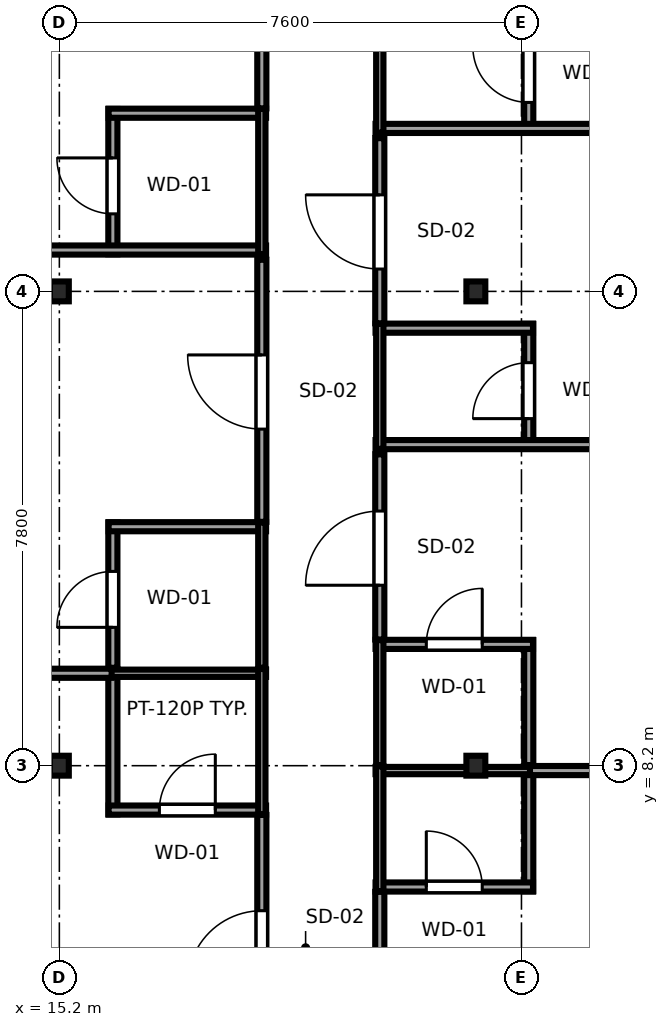
"""IFC4 building model, lengths in metres.
Left out: names, types, materials, properties, quantities, classifications, styles, units other than length and angle.
Written with IfcOpenShell. Run it as: python <this file> out.ifc"""

import sys

from ifc_helpers import new_model, si_unit, direction, frame, frame_2d, origin, origin_2d, place, context, subcontext, project, spatial, rectangle, i_section, extrude, source, transform, mapped, element, fill, save


model = new_model("IFC4")
c1 = context("Model", 3, precision=1e-05, world=origin(), true_north=direction((0.0, 1.0)))
c2 = subcontext(c1, "Body", "Model", "MODEL_VIEW")
j1 = project(units=[si_unit("LENGTHUNIT", "METRE"), si_unit("PLANEANGLEUNIT", "RADIAN")], contexts=[c1])
p1 = place(None, origin())
s1 = spatial("IfcSite", under=j1, at=p1, CompositionType="ELEMENT")
p2 = place(p1, origin())
s2 = spatial("IfcBuilding", under=s1, at=p2, CompositionType="ELEMENT")
p3 = place(p2, frame((0.0, 0.0, 238.1)))
s3 = spatial("IfcBuildingStorey", under=s2, at=p3, CompositionType="ELEMENT", Elevation=238.1)
m1 = source(origin(), c2, "Body", "SweptSolid", [
    extrude(i_section(OverallWidth=0.311, OverallDepth=0.327, WebThickness=0.016, FlangeThickness=0.025, FilletRadius=0.017, at=origin_2d()), origin(), (0.0, 0.0, 1.0), 3.55),
])
for number, where, z_axis, x_axis in (
    (1, (15.2, 8.2, 0.0), (0.0, 0.0, 1.0), (1.0, 0.0, 0.0)),
    (2, (15.2, 16.0, 0.0), (0.0, 0.0, 1.0), (1.0, 0.0, 0.0)),
    (3, (22.05, 8.2, 0.0), (0.0, 0.0, 1.0), (1.0, 0.0, 0.0)),
    (4, (22.05, 16.0, 0.0), (0.0, 0.0, 1.0), (1.0, 0.0, 0.0)),
):
    element("IfcColumn", number, at=place(p3, frame(where, z_axis=z_axis, x_axis=x_axis)), inside=s3, PredefinedType="COLUMN", context=c2, shape_type="MappedRepresentation", body=[
        mapped(m1, transform((0.0, 0.0, 0.0), x_axis=(1.0, 0.0, 0.0), y_axis=(0.0, 1.0, 0.0), z_axis=(0.0, 0.0, 1.0), scale=1.0)),
    ])
p4 = place(p3, frame((16.08, 7.4, 0.0), z_axis=(0.0, 0.0, 1.0), x_axis=(0.0, 1.0, 0.0)))
e5 = element("IfcWall", 5, at=p4, inside=s3, PredefinedType="PARTITIONING", context=c2, shape_type="SweptSolid", body=[
    extrude(rectangle(XDim=2.39, YDim=0.15, at=frame_2d((1.195, 0.0))), origin(), (0.0, 0.0, 1.0), 3.29),
])
p5 = place(p3, frame((16.01, 7.47, 0.0), z_axis=(0.0, 0.0, 1.0), x_axis=(1.0, 0.0, 0.0)))
e6 = element("IfcWall", 6, at=p5, inside=s3, PredefinedType="PARTITIONING", context=c2, shape_type="SweptSolid", body=[
    extrude(rectangle(XDim=2.59, YDim=0.15, at=frame_2d((1.295, 0.0))), origin(), (0.0, 0.0, 1.0), 3.29),
])
p6 = place(p5, frame((0.835, 0.0, 0.0)))
e7 = element("IfcOpeningElement", 7, at=p6, cuts=e6, PredefinedType="OPENING", context=c2, shape_type="SweptSolid", body=[
    extrude(rectangle(XDim=0.92, YDim=2.01, at=frame_2d((0.46, 1.005))), frame((0.0, 0.085, 0.0), z_axis=(0.0, -1.0, 0.0), x_axis=(1.0, 0.0, 0.0)), (0.0, 0.0, 1.0), 0.17),
])
p7 = place(p3, frame((16.01, 9.72, 0.0), z_axis=(0.0, 0.0, 1.0), x_axis=(1.0, 0.0, 0.0)))
e8 = element("IfcWall", 8, at=p7, inside=s3, PredefinedType="PLUMBINGWALL", context=c2, shape_type="SweptSolid", body=[
    extrude(rectangle(XDim=2.59, YDim=0.12, at=frame_2d((1.295, 0.0))), origin(), (0.0, 0.0, 1.0), 3.29),
])
p8 = place(p3, frame((18.53, 7.4, 0.0), z_axis=(0.0, 0.0, 1.0), x_axis=(0.0, 1.0, 0.0)))
e9 = element("IfcWall", 9, at=p8, inside=s3, PredefinedType="PLUMBINGWALL", context=c2, shape_type="SweptSolid", body=[
    extrude(rectangle(XDim=2.39, YDim=0.12, at=frame_2d((1.195, 0.0))), origin(), (0.0, 0.0, 1.0), 3.29),
])
p9 = place(p3, frame((16.08, 9.81, 0.0), z_axis=(0.0, 0.0, 1.0), x_axis=(0.0, 1.0, 0.0)))
e10 = element("IfcWall", 10, at=p9, inside=s3, PredefinedType="PARTITIONING", context=c2, shape_type="SweptSolid", body=[
    extrude(rectangle(XDim=2.39, YDim=0.15, at=frame_2d((1.195, 0.0))), origin(), (0.0, 0.0, 1.0), 3.29),
])
p10 = place(p9, frame((0.665, 0.0, 0.0)))
e11 = element("IfcOpeningElement", 11, at=p10, cuts=e10, PredefinedType="OPENING", context=c2, shape_type="SweptSolid", body=[
    extrude(rectangle(XDim=0.92, YDim=2.01, at=frame_2d((0.46, 1.005))), frame((0.0, 0.085, 0.0), z_axis=(0.0, -1.0, 0.0), x_axis=(1.0, 0.0, 0.0)), (0.0, 0.0, 1.0), 0.17),
])
p11 = place(p3, frame((16.01, 12.13, 0.0), z_axis=(0.0, 0.0, 1.0), x_axis=(1.0, 0.0, 0.0)))
e12 = element("IfcWall", 12, at=p11, inside=s3, PredefinedType="PARTITIONING", context=c2, shape_type="SweptSolid", body=[
    extrude(rectangle(XDim=2.59, YDim=0.15, at=frame_2d((1.295, 0.0))), origin(), (0.0, 0.0, 1.0), 3.29),
])
p12 = place(p3, frame((18.53, 9.81, 0.0), z_axis=(0.0, 0.0, 1.0), x_axis=(0.0, 1.0, 0.0)))
e13 = element("IfcWall", 13, at=p12, inside=s3, PredefinedType="PLUMBINGWALL", context=c2, shape_type="SweptSolid", body=[
    extrude(rectangle(XDim=2.39, YDim=0.12, at=frame_2d((1.195, 0.0))), origin(), (0.0, 0.0, 1.0), 3.29),
])
p13 = place(p3, frame((16.08, 16.61, 0.0), z_axis=(0.0, 0.0, 1.0), x_axis=(0.0, 1.0, 0.0)))
e14 = element("IfcWall", 14, at=p13, inside=s3, PredefinedType="PARTITIONING", context=c2, shape_type="SweptSolid", body=[
    extrude(rectangle(XDim=2.39, YDim=0.15, at=frame_2d((1.195, 0.0))), origin(), (0.0, 0.0, 1.0), 3.29),
])
p14 = place(p13, frame((0.665, 0.0, 0.0)))
e15 = element("IfcOpeningElement", 15, at=p14, cuts=e14, PredefinedType="OPENING", context=c2, shape_type="SweptSolid", body=[
    extrude(rectangle(XDim=0.92, YDim=2.01, at=frame_2d((0.46, 1.005))), frame((0.0, 0.085, 0.0), z_axis=(0.0, -1.0, 0.0), x_axis=(1.0, 0.0, 0.0)), (0.0, 0.0, 1.0), 0.17),
])
p15 = place(p3, frame((3.005, 16.68, 0.0), z_axis=(0.0, 0.0, 1.0), x_axis=(1.0, 0.0, 0.0)))
e16 = element("IfcWall", 16, at=p15, inside=s3, PredefinedType="PARTITIONING", context=c2, shape_type="SweptSolid", body=[
    extrude(rectangle(XDim=15.595, YDim=0.15, at=frame_2d((7.798, 0.0))), origin(), (0.0, 0.0, 1.0), 3.29),
])
p16 = place(p3, frame((16.01, 18.93, 0.0), z_axis=(0.0, 0.0, 1.0), x_axis=(1.0, 0.0, 0.0)))
e17 = element("IfcWall", 17, at=p16, inside=s3, PredefinedType="PARTITIONING", context=c2, shape_type="SweptSolid", body=[
    extrude(rectangle(XDim=2.59, YDim=0.15, at=frame_2d((1.295, 0.0))), origin(), (0.0, 0.0, 1.0), 3.29),
])
p17 = place(p3, frame((18.53, 16.61, 0.0), z_axis=(0.0, 0.0, 1.0), x_axis=(0.0, 1.0, 0.0)))
e18 = element("IfcWall", 18, at=p17, inside=s3, PredefinedType="PLUMBINGWALL", context=c2, shape_type="SweptSolid", body=[
    extrude(rectangle(XDim=2.39, YDim=0.12, at=frame_2d((1.195, 0.0))), origin(), (0.0, 0.0, 1.0), 3.29),
])
p18 = place(p3, frame((22.92, 6.135, 0.0), z_axis=(0.0, 0.0, 1.0), x_axis=(0.0, 1.0, 0.0)))
e19 = element("IfcWall", 19, at=p18, inside=s3, PredefinedType="PARTITIONING", context=c2, shape_type="SweptSolid", body=[
    extrude(rectangle(XDim=2.055, YDim=0.15, at=frame_2d((1.027, 0.0))), origin(), (0.0, 0.0, 1.0), 3.29),
])
p19 = place(p3, frame((20.4, 6.205, 0.0), z_axis=(0.0, 0.0, 1.0), x_axis=(1.0, 0.0, 0.0)))
e20 = element("IfcWall", 20, at=p19, inside=s3, PredefinedType="PARTITIONING", context=c2, shape_type="SweptSolid", body=[
    extrude(rectangle(XDim=2.59, YDim=0.15, at=frame_2d((1.295, 0.0))), origin(), (0.0, 0.0, 1.0), 3.29),
])
p20 = place(p19, frame((0.835, 0.0, 0.0)))
e21 = element("IfcOpeningElement", 21, at=p20, cuts=e20, PredefinedType="OPENING", context=c2, shape_type="SweptSolid", body=[
    extrude(rectangle(XDim=0.92, YDim=2.01, at=frame_2d((0.46, 1.005))), frame((0.0, 0.085, 0.0), z_axis=(0.0, -1.0, 0.0), x_axis=(1.0, 0.0, 0.0)), (0.0, 0.0, 1.0), 0.17),
])
p21 = place(p3, frame((20.4, 8.12, 0.0), z_axis=(0.0, 0.0, 1.0), x_axis=(1.0, 0.0, 0.0)))
e22 = element("IfcWall", 22, at=p21, inside=s3, PredefinedType="PLUMBINGWALL", context=c2, shape_type="SweptSolid", body=[
    extrude(rectangle(XDim=2.59, YDim=0.12, at=frame_2d((1.295, 0.0))), origin(), (0.0, 0.0, 1.0), 3.29),
])
p22 = place(p3, frame((20.47, 6.135, 0.0), z_axis=(0.0, 0.0, 1.0), x_axis=(0.0, 1.0, 0.0)))
e23 = element("IfcWall", 23, at=p22, inside=s3, PredefinedType="PLUMBINGWALL", context=c2, shape_type="SweptSolid", body=[
    extrude(rectangle(XDim=2.055, YDim=0.12, at=frame_2d((1.027, 0.0))), origin(), (0.0, 0.0, 1.0), 3.29),
])
p23 = place(p3, frame((22.92, 8.21, 0.0), z_axis=(0.0, 0.0, 1.0), x_axis=(0.0, 1.0, 0.0)))
e24 = element("IfcWall", 24, at=p23, inside=s3, PredefinedType="PARTITIONING", context=c2, shape_type="SweptSolid", body=[
    extrude(rectangle(XDim=2.055, YDim=0.15, at=frame_2d((1.027, 0.0))), origin(), (0.0, 0.0, 1.0), 3.29),
])
p24 = place(p3, frame((20.4, 10.195, 0.0), z_axis=(0.0, 0.0, 1.0), x_axis=(1.0, 0.0, 0.0)))
e25 = element("IfcWall", 25, at=p24, inside=s3, PredefinedType="PARTITIONING", context=c2, shape_type="SweptSolid", body=[
    extrude(rectangle(XDim=2.59, YDim=0.15, at=frame_2d((1.295, 0.0))), origin(), (0.0, 0.0, 1.0), 3.29),
])
p25 = place(p24, frame((0.835, 0.0, 0.0)))
e26 = element("IfcOpeningElement", 26, at=p25, cuts=e25, PredefinedType="OPENING", context=c2, shape_type="SweptSolid", body=[
    extrude(rectangle(XDim=0.92, YDim=2.01, at=frame_2d((0.46, 1.005))), frame((0.0, 0.085, 0.0), z_axis=(0.0, -1.0, 0.0), x_axis=(1.0, 0.0, 0.0)), (0.0, 0.0, 1.0), 0.17),
])
p26 = place(p3, frame((20.47, 8.21, 0.0), z_axis=(0.0, 0.0, 1.0), x_axis=(0.0, 1.0, 0.0)))
e27 = element("IfcWall", 27, at=p26, inside=s3, PredefinedType="PLUMBINGWALL", context=c2, shape_type="SweptSolid", body=[
    extrude(rectangle(XDim=2.055, YDim=0.12, at=frame_2d((1.027, 0.0))), origin(), (0.0, 0.0, 1.0), 3.29),
])
p27 = place(p3, frame((22.92, 13.41, 0.0), z_axis=(0.0, 0.0, 1.0), x_axis=(0.0, 1.0, 0.0)))
e28 = element("IfcWall", 28, at=p27, inside=s3, PredefinedType="PARTITIONING", context=c2, shape_type="SweptSolid", body=[
    extrude(rectangle(XDim=2.055, YDim=0.15, at=frame_2d((1.028, 0.0))), origin(), (0.0, 0.0, 1.0), 3.29),
])
p28 = place(p27, frame((0.498, 0.0, 0.0)))
e29 = element("IfcOpeningElement", 29, at=p28, cuts=e28, PredefinedType="OPENING", context=c2, shape_type="SweptSolid", body=[
    extrude(rectangle(XDim=0.92, YDim=2.01, at=frame_2d((0.46, 1.005))), frame((0.0, 0.085, 0.0), z_axis=(0.0, -1.0, 0.0), x_axis=(1.0, 0.0, 0.0)), (0.0, 0.0, 1.0), 0.17),
])
p29 = place(p3, frame((20.4, 13.48, 0.0), z_axis=(0.0, 0.0, 1.0), x_axis=(1.0, 0.0, 0.0)))
e30 = element("IfcWall", 30, at=p29, inside=s3, PredefinedType="PARTITIONING", context=c2, shape_type="SweptSolid", body=[
    extrude(rectangle(XDim=18.995, YDim=0.15, at=frame_2d((9.498, 0.0))), origin(), (0.0, 0.0, 1.0), 3.29),
])
p30 = place(p3, frame((20.4, 15.395, 0.0), z_axis=(0.0, 0.0, 1.0), x_axis=(1.0, 0.0, 0.0)))
e31 = element("IfcWall", 31, at=p30, inside=s3, PredefinedType="PARTITIONING", context=c2, shape_type="SweptSolid", body=[
    extrude(rectangle(XDim=2.59, YDim=0.15, at=frame_2d((1.295, 0.0))), origin(), (0.0, 0.0, 1.0), 3.29),
])
p31 = place(p3, frame((20.47, 13.41, 0.0), z_axis=(0.0, 0.0, 1.0), x_axis=(0.0, 1.0, 0.0)))
e32 = element("IfcWall", 32, at=p31, inside=s3, PredefinedType="PLUMBINGWALL", context=c2, shape_type="SweptSolid", body=[
    extrude(rectangle(XDim=2.055, YDim=0.12, at=frame_2d((1.028, 0.0))), origin(), (0.0, 0.0, 1.0), 3.29),
])
p32 = place(p3, frame((22.92, 18.61, 0.0), z_axis=(0.0, 0.0, 1.0), x_axis=(0.0, 1.0, 0.0)))
e33 = element("IfcWall", 33, at=p32, inside=s3, PredefinedType="PARTITIONING", context=c2, shape_type="SweptSolid", body=[
    extrude(rectangle(XDim=2.055, YDim=0.15, at=frame_2d((1.027, 0.0))), origin(), (0.0, 0.0, 1.0), 3.29),
])
p33 = place(p32, frame((0.498, 0.0, 0.0)))
e34 = element("IfcOpeningElement", 34, at=p33, cuts=e33, PredefinedType="OPENING", context=c2, shape_type="SweptSolid", body=[
    extrude(rectangle(XDim=0.92, YDim=2.01, at=frame_2d((0.46, 1.005))), frame((0.0, 0.085, 0.0), z_axis=(0.0, -1.0, 0.0), x_axis=(1.0, 0.0, 0.0)), (0.0, 0.0, 1.0), 0.17),
])
p34 = place(p3, frame((20.4, 18.68, 0.0), z_axis=(0.0, 0.0, 1.0), x_axis=(1.0, 0.0, 0.0)))
e35 = element("IfcWall", 35, at=p34, inside=s3, PredefinedType="PARTITIONING", context=c2, shape_type="SweptSolid", body=[
    extrude(rectangle(XDim=18.995, YDim=0.15, at=frame_2d((9.498, 0.0))), origin(), (0.0, 0.0, 1.0), 3.29),
])
p35 = place(p3, frame((20.47, 18.61, 0.0), z_axis=(0.0, 0.0, 1.0), x_axis=(0.0, 1.0, 0.0)))
e36 = element("IfcWall", 36, at=p35, inside=s3, PredefinedType="PLUMBINGWALL", context=c2, shape_type="SweptSolid", body=[
    extrude(rectangle(XDim=2.055, YDim=0.12, at=frame_2d((1.027, 0.0))), origin(), (0.0, 0.0, 1.0), 3.29),
])
p36 = place(p3, frame((18.53, 3.005, 0.0), z_axis=(0.0, 0.0, 1.0), x_axis=(0.0, 1.0, 0.0)))
e37 = element("IfcWall", 37, at=p36, inside=s3, PredefinedType="PARTITIONING", context=c2, shape_type="SweptSolid", body=[
    extrude(rectangle(XDim=4.385, YDim=0.15, at=frame_2d((2.192, 0.0))), origin(), (0.0, 0.0, 1.0), 3.29),
])
p37 = place(p36, frame((1.59, 0.0, 0.0)))
e38 = element("IfcOpeningElement", 38, at=p37, cuts=e37, PredefinedType="OPENING", context=c2, shape_type="SweptSolid", body=[
    extrude(rectangle(XDim=1.22, YDim=2.08, at=frame_2d((0.61, 1.04))), frame((0.0, 0.085, 0.0), z_axis=(0.0, -1.0, 0.0), x_axis=(1.0, 0.0, 0.0)), (0.0, 0.0, 1.0), 0.17),
])
p38 = place(p3, frame((3.005, 9.72, 0.0), z_axis=(0.0, 0.0, 1.0), x_axis=(1.0, 0.0, 0.0)))
e39 = element("IfcWall", 39, at=p38, inside=s3, PredefinedType="PARTITIONING", context=c2, shape_type="SweptSolid", body=[
    extrude(rectangle(XDim=13.055, YDim=0.15, at=frame_2d((6.528, 0.0))), origin(), (0.0, 0.0, 1.0), 3.29),
])
p39 = place(p3, frame((18.53, 12.21, 0.0), z_axis=(0.0, 0.0, 1.0), x_axis=(0.0, 1.0, 0.0)))
e40 = element("IfcWall", 40, at=p39, inside=s3, PredefinedType="PARTITIONING", context=c2, shape_type="SweptSolid", body=[
    extrude(rectangle(XDim=4.31, YDim=0.15, at=frame_2d((2.155, 0.0))), origin(), (0.0, 0.0, 1.0), 3.29),
])
p40 = place(p39, frame((1.525, 0.0, 0.0)))
e41 = element("IfcOpeningElement", 41, at=p40, cuts=e40, PredefinedType="OPENING", context=c2, shape_type="SweptSolid", body=[
    extrude(rectangle(XDim=1.22, YDim=2.08, at=frame_2d((0.61, 1.04))), frame((0.0, 0.085, 0.0), z_axis=(0.0, -1.0, 0.0), x_axis=(1.0, 0.0, 0.0)), (0.0, 0.0, 1.0), 0.17),
])
p41 = place(p3, frame((18.53, 19.01, 0.0), z_axis=(0.0, 0.0, 1.0), x_axis=(0.0, 1.0, 0.0)))
e42 = element("IfcWall", 42, at=p41, inside=s3, PredefinedType="PARTITIONING", context=c2, shape_type="SweptSolid", body=[
    extrude(rectangle(XDim=4.31, YDim=0.15, at=frame_2d((2.155, 0.0))), origin(), (0.0, 0.0, 1.0), 3.29),
])
p42 = place(p41, frame((1.525, 0.0, 0.0)))
e43 = element("IfcOpeningElement", 43, at=p42, cuts=e42, PredefinedType="OPENING", context=c2, shape_type="SweptSolid", body=[
    extrude(rectangle(XDim=1.22, YDim=2.08, at=frame_2d((0.61, 1.04))), frame((0.0, 0.085, 0.0), z_axis=(0.0, -1.0, 0.0), x_axis=(1.0, 0.0, 0.0)), (0.0, 0.0, 1.0), 0.17),
])
p43 = place(p3, frame((20.47, 3.005, 0.0), z_axis=(0.0, 0.0, 1.0), x_axis=(0.0, 1.0, 0.0)))
e44 = element("IfcWall", 44, at=p43, inside=s3, PredefinedType="PARTITIONING", context=c2, shape_type="SweptSolid", body=[
    extrude(rectangle(XDim=3.12, YDim=0.15, at=frame_2d((1.56, 0.0))), origin(), (0.0, 0.0, 1.0), 3.29),
])
p44 = place(p43, frame((0.958, 0.0, 0.0)))
e45 = element("IfcOpeningElement", 45, at=p44, cuts=e44, PredefinedType="OPENING", context=c2, shape_type="SweptSolid", body=[
    extrude(rectangle(XDim=1.22, YDim=2.08, at=frame_2d((0.61, 1.04))), frame((0.0, 0.085, 0.0), z_axis=(0.0, -1.0, 0.0), x_axis=(1.0, 0.0, 0.0)), (0.0, 0.0, 1.0), 0.17),
])
p45 = place(p3, frame((22.94, 8.12, 0.0), z_axis=(0.0, 0.0, 1.0), x_axis=(1.0, 0.0, 0.0)))
e46 = element("IfcWall", 46, at=p45, inside=s3, PredefinedType="PARTITIONING", context=c2, shape_type="SweptSolid", body=[
    extrude(rectangle(XDim=16.455, YDim=0.15, at=frame_2d((8.228, 0.0))), origin(), (0.0, 0.0, 1.0), 2.08),
])
p46 = place(p3, frame((20.47, 10.275, 0.0), z_axis=(0.0, 0.0, 1.0), x_axis=(0.0, 1.0, 0.0)))
e47 = element("IfcWall", 47, at=p46, inside=s3, PredefinedType="PARTITIONING", context=c2, shape_type="SweptSolid", body=[
    extrude(rectangle(XDim=3.045, YDim=0.15, at=frame_2d((1.522, 0.0))), origin(), (0.0, 0.0, 1.0), 3.29),
])
p47 = place(p46, frame((0.893, 0.0, 0.0)))
e48 = element("IfcOpeningElement", 48, at=p47, cuts=e47, PredefinedType="OPENING", context=c2, shape_type="SweptSolid", body=[
    extrude(rectangle(XDim=1.22, YDim=2.08, at=frame_2d((0.61, 1.04))), frame((0.0, 0.085, 0.0), z_axis=(0.0, -1.0, 0.0), x_axis=(1.0, 0.0, 0.0)), (0.0, 0.0, 1.0), 0.17),
])
p48 = place(p3, frame((20.47, 15.475, 0.0), z_axis=(0.0, 0.0, 1.0), x_axis=(0.0, 1.0, 0.0)))
e49 = element("IfcWall", 49, at=p48, inside=s3, PredefinedType="PARTITIONING", context=c2, shape_type="SweptSolid", body=[
    extrude(rectangle(XDim=3.045, YDim=0.15, at=frame_2d((1.522, 0.0))), origin(), (0.0, 0.0, 1.0), 3.29),
])
p49 = place(p48, frame((0.893, 0.0, 0.0)))
e50 = element("IfcOpeningElement", 50, at=p49, cuts=e49, PredefinedType="OPENING", context=c2, shape_type="SweptSolid", body=[
    extrude(rectangle(XDim=1.22, YDim=2.08, at=frame_2d((0.61, 1.04))), frame((0.0, 0.085, 0.0), z_axis=(0.0, -1.0, 0.0), x_axis=(1.0, 0.0, 0.0)), (0.0, 0.0, 1.0), 0.17),
])
m2 = source(origin(), c2, "Body", "SweptSolid", [
    extrude(rectangle(XDim=0.92, YDim=2.01, at=frame_2d((0.46, 1.005))), frame((0.0, 0.025, 0.0), z_axis=(0.0, -1.0, 0.0), x_axis=(1.0, 0.0, 0.0)), (0.0, 0.0, 1.0), 0.05),
])
p50 = place(p6, origin())
e51 = element("IfcDoor", 51, at=p50, inside=s3, OperationType="SINGLE_SWING_RIGHT", PredefinedType="DOOR", context=c2, shape_type="MappedRepresentation", body=[
    mapped(m2, transform((0.0, 0.0, 0.0), x_axis=(1.0, 0.0, 0.0), y_axis=(0.0, 1.0, 0.0), z_axis=(0.0, 0.0, 1.0), scale=1.0)),
])
fill(e7, e51)
p51 = place(p10, origin())
e52 = element("IfcDoor", 52, at=p51, inside=s3, OperationType="SINGLE_SWING_LEFT", PredefinedType="DOOR", context=c2, shape_type="MappedRepresentation", body=[
    mapped(m2, transform((0.0, 0.0, 0.0), x_axis=(1.0, 0.0, 0.0), y_axis=(0.0, 1.0, 0.0), z_axis=(0.0, 0.0, 1.0), scale=1.0)),
])
fill(e11, e52)
p52 = place(p14, origin())
e53 = element("IfcDoor", 53, at=p52, inside=s3, OperationType="SINGLE_SWING_RIGHT", PredefinedType="DOOR", context=c2, shape_type="MappedRepresentation", body=[
    mapped(m2, transform((0.0, 0.0, 0.0), x_axis=(1.0, 0.0, 0.0), y_axis=(0.0, 1.0, 0.0), z_axis=(0.0, 0.0, 1.0), scale=1.0)),
])
fill(e15, e53)
p53 = place(p20, origin())
e54 = element("IfcDoor", 54, at=p53, inside=s3, OperationType="SINGLE_SWING_LEFT", PredefinedType="DOOR", context=c2, shape_type="MappedRepresentation", body=[
    mapped(m2, transform((0.0, 0.0, 0.0), x_axis=(1.0, 0.0, 0.0), y_axis=(0.0, 1.0, 0.0), z_axis=(0.0, 0.0, 1.0), scale=1.0)),
])
fill(e21, e54)
p54 = place(p25, origin())
e55 = element("IfcDoor", 55, at=p54, inside=s3, OperationType="SINGLE_SWING_RIGHT", PredefinedType="DOOR", context=c2, shape_type="MappedRepresentation", body=[
    mapped(m2, transform((0.0, 0.0, 0.0), x_axis=(1.0, 0.0, 0.0), y_axis=(0.0, 1.0, 0.0), z_axis=(0.0, 0.0, 1.0), scale=1.0)),
])
fill(e26, e55)
p55 = place(p28, origin())
e56 = element("IfcDoor", 56, at=p55, inside=s3, OperationType="SINGLE_SWING_LEFT", PredefinedType="DOOR", context=c2, shape_type="MappedRepresentation", body=[
    mapped(m2, transform((0.0, 0.0, 0.0), x_axis=(1.0, 0.0, 0.0), y_axis=(0.0, 1.0, 0.0), z_axis=(0.0, 0.0, 1.0), scale=1.0)),
])
fill(e29, e56)
p56 = place(p33, origin())
e57 = element("IfcDoor", 57, at=p56, inside=s3, OperationType="SINGLE_SWING_RIGHT", PredefinedType="DOOR", context=c2, shape_type="MappedRepresentation", body=[
    mapped(m2, transform((0.0, 0.0, 0.0), x_axis=(1.0, 0.0, 0.0), y_axis=(0.0, 1.0, 0.0), z_axis=(0.0, 0.0, 1.0), scale=1.0)),
])
fill(e34, e57)
m3 = source(origin(), c2, "Body", "SweptSolid", [
    extrude(rectangle(XDim=1.22, YDim=2.08, at=frame_2d((0.61, 1.04))), frame((0.0, 0.025, 0.0), z_axis=(0.0, -1.0, 0.0), x_axis=(1.0, 0.0, 0.0)), (0.0, 0.0, 1.0), 0.05),
])
p57 = place(p37, origin())
e58 = element("IfcDoor", 58, at=p57, inside=s3, OperationType="SINGLE_SWING_LEFT", PredefinedType="DOOR", context=c2, shape_type="MappedRepresentation", body=[
    mapped(m3, transform((0.0, 0.0, 0.0), x_axis=(1.0, 0.0, 0.0), y_axis=(0.0, 1.0, 0.0), z_axis=(0.0, 0.0, 1.0), scale=1.0)),
])
fill(e38, e58)
p58 = place(p40, origin())
e59 = element("IfcDoor", 59, at=p58, inside=s3, OperationType="SINGLE_SWING_RIGHT", PredefinedType="DOOR", context=c2, shape_type="MappedRepresentation", body=[
    mapped(m3, transform((0.0, 0.0, 0.0), x_axis=(1.0, 0.0, 0.0), y_axis=(0.0, 1.0, 0.0), z_axis=(0.0, 0.0, 1.0), scale=1.0)),
])
fill(e41, e59)
p59 = place(p47, origin())
e60 = element("IfcDoor", 60, at=p59, inside=s3, OperationType="SINGLE_SWING_LEFT", PredefinedType="DOOR", context=c2, shape_type="MappedRepresentation", body=[
    mapped(m3, transform((0.0, 0.0, 0.0), x_axis=(1.0, 0.0, 0.0), y_axis=(0.0, 1.0, 0.0), z_axis=(0.0, 0.0, 1.0), scale=1.0)),
])
fill(e48, e60)
p60 = place(p49, origin())
e61 = element("IfcDoor", 61, at=p60, inside=s3, OperationType="SINGLE_SWING_RIGHT", PredefinedType="DOOR", context=c2, shape_type="MappedRepresentation", body=[
    mapped(m3, transform((0.0, 0.0, 0.0), x_axis=(1.0, 0.0, 0.0), y_axis=(0.0, 1.0, 0.0), z_axis=(0.0, 0.0, 1.0), scale=1.0)),
])
fill(e50, e61)
save(model, sys.argv[1])
